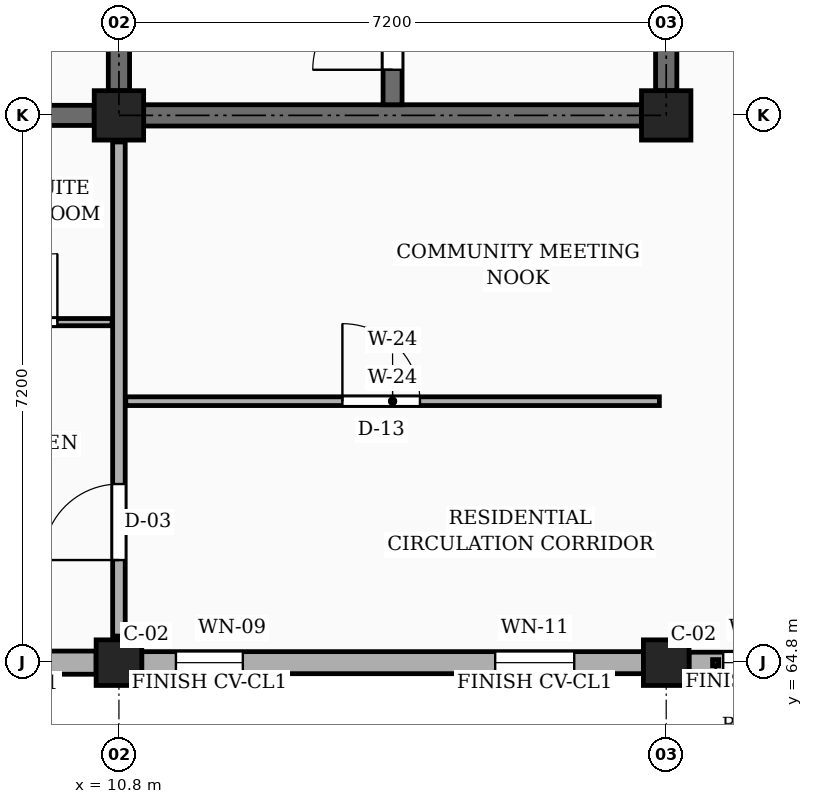
"""IFC4 building model, lengths in metres.
Left out: names, types, materials, properties, quantities, classifications, styles, units other than length and angle.
Written with IfcOpenShell. Run it as: python <this file> out.ifc"""

import sys

from ifc_helpers import new_model, si_unit, direction, frame, frame_2d, origin, origin_2d, place, context, subcontext, project, spatial, rectangle, extrude, element, fill, save


model = new_model("IFC4")
c1 = context("Model", 3, precision=1e-05, world=origin(), true_north=direction((0.0, 1.0)))
c2 = subcontext(c1, "Body", "Model", "MODEL_VIEW")
j1 = project(units=[si_unit("LENGTHUNIT", "METRE"), si_unit("PLANEANGLEUNIT", "RADIAN")], contexts=[c1])
p1 = place(None, origin())
s1 = spatial("IfcSite", under=j1, at=p1, CompositionType="ELEMENT")
p2 = place(p1, origin())
s2 = spatial("IfcBuilding", under=s1, at=p2, CompositionType="ELEMENT")
p3 = place(p2, frame((0.0, 0.0, 7.65)))
s3 = spatial("IfcBuildingStorey", under=s2, at=p3, CompositionType="ELEMENT", Elevation=7.65)
p4 = place(p3, frame((10.8, 64.8, 0.0), z_axis=(0.0, 0.0, 1.0), x_axis=(1.0, 0.0, 0.0)))
e1 = element("IfcColumn", 1, at=p4, inside=s3, PredefinedType="COLUMN", context=c2, shape_type="SweptSolid", body=[
    extrude(rectangle(XDim=0.6, YDim=0.6, at=origin_2d()), origin(), (0.0, 0.0, 1.0), 3.15),
])
p5 = place(p3, frame((10.8, 72.0, 0.0), z_axis=(0.0, 0.0, 1.0), x_axis=(1.0, 0.0, 0.0)))
e2 = element("IfcColumn", 2, at=p5, inside=s3, PredefinedType="COLUMN", context=c2, shape_type="SweptSolid", body=[
    extrude(rectangle(XDim=0.65, YDim=0.65, at=origin_2d()), origin(), (0.0, 0.0, 1.0), 3.15),
])
p6 = place(p3, frame((18.0, 64.8, 0.0), z_axis=(0.0, 0.0, 1.0), x_axis=(1.0, 0.0, 0.0)))
e3 = element("IfcColumn", 3, at=p6, inside=s3, PredefinedType="COLUMN", context=c2, shape_type="SweptSolid", body=[
    extrude(rectangle(XDim=0.6, YDim=0.6, at=origin_2d()), origin(), (0.0, 0.0, 1.0), 3.15),
])
p7 = place(p3, frame((18.0, 72.0, 0.0), z_axis=(0.0, 0.0, 1.0), x_axis=(1.0, 0.0, 0.0)))
e4 = element("IfcColumn", 4, at=p7, inside=s3, PredefinedType="COLUMN", context=c2, shape_type="SweptSolid", body=[
    extrude(rectangle(XDim=0.65, YDim=0.65, at=origin_2d()), origin(), (0.0, 0.0, 1.0), 3.15),
])
p8 = place(p3, frame((3.9, 72.0, 0.0), z_axis=(0.0, 0.0, 1.0), x_axis=(1.0, 0.0, 0.0)))
e5 = element("IfcWall", 5, at=p8, inside=s3, PredefinedType="SOLIDWALL", context=c2, shape_type="SweptSolid", body=[
    extrude(rectangle(XDim=6.575, YDim=0.265, at=frame_2d((3.288, 0.0))), origin(), (0.0, 0.0, 1.0), 2.21),
])
p9 = place(p8, frame((1.35, 0.0, 0.0)))
e6 = element("IfcOpeningElement", 6, at=p9, cuts=e5, PredefinedType="OPENING", context=c2, shape_type="SweptSolid", body=[
    extrude(rectangle(XDim=0.98, YDim=2.12, at=frame_2d((0.49, 1.06))), frame((0.0, 0.143, 0.0), z_axis=(0.0, -1.0, 0.0), x_axis=(1.0, 0.0, 0.0)), (0.0, 0.0, 1.0), 0.285),
])
p10 = place(p3, frame((3.9, 64.8, 0.0), z_axis=(0.0, 0.0, 1.0), x_axis=(1.0, 0.0, 0.0)))
e7 = element("IfcWall", 7, at=p10, inside=s3, PredefinedType="SOLIDWALL", context=c2, shape_type="SweptSolid", body=[
    extrude(rectangle(XDim=6.6, YDim=0.305, at=frame_2d((3.3, 0.0))), origin(), (0.0, 0.0, 1.0), 2.48),
])
p11 = place(p10, frame((0.45, 0.0, 0.78)))
e8 = element("IfcOpeningElement", 8, at=p11, cuts=e7, PredefinedType="OPENING", context=c2, shape_type="SweptSolid", body=[
    extrude(rectangle(XDim=1.32, YDim=1.15, at=frame_2d((0.66, 0.575))), frame((0.0, 0.163, 0.0), z_axis=(0.0, -1.0, 0.0), x_axis=(1.0, 0.0, 0.0)), (0.0, 0.0, 1.0), 0.325),
])
p12 = place(p10, frame((4.65, 0.0, 0.78)))
e9 = element("IfcOpeningElement", 9, at=p12, cuts=e7, PredefinedType="OPENING", context=c2, shape_type="SweptSolid", body=[
    extrude(rectangle(XDim=0.88, YDim=1.26, at=frame_2d((0.44, 0.63))), frame((0.0, 0.163, 0.0), z_axis=(0.0, -1.0, 0.0), x_axis=(1.0, 0.0, 0.0)), (0.0, 0.0, 1.0), 0.325),
])
p13 = place(p3, frame((11.1, 64.8, 0.0), z_axis=(0.0, 0.0, 1.0), x_axis=(1.0, 0.0, 0.0)))
e10 = element("IfcWall", 10, at=p13, inside=s3, PredefinedType="SOLIDWALL", context=c2, shape_type="SweptSolid", body=[
    extrude(rectangle(XDim=6.6, YDim=0.29, at=frame_2d((3.3, 0.0))), origin(), (0.0, 0.0, 1.0), 2.48),
])
p14 = place(p13, frame((0.45, 0.0, 0.78)))
e11 = element("IfcOpeningElement", 11, at=p14, cuts=e10, PredefinedType="OPENING", context=c2, shape_type="SweptSolid", body=[
    extrude(rectangle(XDim=0.88, YDim=1.26, at=frame_2d((0.44, 0.63))), frame((0.0, 0.155, 0.0), z_axis=(0.0, -1.0, 0.0), x_axis=(1.0, 0.0, 0.0)), (0.0, 0.0, 1.0), 0.31),
])
p15 = place(p13, frame((4.65, 0.0, 0.78)))
e12 = element("IfcOpeningElement", 12, at=p15, cuts=e10, PredefinedType="OPENING", context=c2, shape_type="SweptSolid", body=[
    extrude(rectangle(XDim=1.04, YDim=1.26, at=frame_2d((0.52, 0.63))), frame((0.0, 0.155, 0.0), z_axis=(0.0, -1.0, 0.0), x_axis=(1.0, 0.0, 0.0)), (0.0, 0.0, 1.0), 0.31),
])
p16 = place(p3, frame((18.3, 64.8, 0.0), z_axis=(0.0, 0.0, 1.0), x_axis=(1.0, 0.0, 0.0)))
e13 = element("IfcWall", 13, at=p16, inside=s3, PredefinedType="SOLIDWALL", context=c2, shape_type="SweptSolid", body=[
    extrude(rectangle(XDim=6.6, YDim=0.275, at=frame_2d((3.3, 0.0))), origin(), (0.0, 0.0, 1.0), 2.48),
])
p17 = place(p16, frame((0.45, 0.0, 0.78)))
e14 = element("IfcOpeningElement", 14, at=p17, cuts=e13, PredefinedType="OPENING", context=c2, shape_type="SweptSolid", body=[
    extrude(rectangle(XDim=1.04, YDim=1.26, at=frame_2d((0.52, 0.63))), frame((0.0, 0.147, 0.0), z_axis=(0.0, -1.0, 0.0), x_axis=(1.0, 0.0, 0.0)), (0.0, 0.0, 1.0), 0.295),
])
p18 = place(p16, frame((2.15, 0.0, 0.78)))
e15 = element("IfcOpeningElement", 15, at=p18, cuts=e13, PredefinedType="OPENING", context=c2, shape_type="SweptSolid", body=[
    extrude(rectangle(XDim=1.2, YDim=1.26, at=frame_2d((0.6, 0.63))), frame((0.0, 0.147, 0.0), z_axis=(0.0, -1.0, 0.0), x_axis=(1.0, 0.0, 0.0)), (0.0, 0.0, 1.0), 0.295),
])
p19 = place(p16, frame((4.4, 0.0, 0.78)))
e16 = element("IfcOpeningElement", 16, at=p19, cuts=e13, PredefinedType="OPENING", context=c2, shape_type="SweptSolid", body=[
    extrude(rectangle(XDim=1.36, YDim=1.26, at=frame_2d((0.68, 0.63))), frame((0.0, 0.147, 0.0), z_axis=(0.0, -1.0, 0.0), x_axis=(1.0, 0.0, 0.0)), (0.0, 0.0, 1.0), 0.295),
])
p20 = place(p3, frame((10.8, 72.325, 0.0), z_axis=(0.0, 0.0, 1.0), x_axis=(0.0, 1.0, 0.0)))
e17 = element("IfcWall", 17, at=p20, inside=s3, PredefinedType="SHEAR", context=c2, shape_type="SweptSolid", body=[
    extrude(rectangle(XDim=6.55, YDim=0.28, at=frame_2d((3.275, 0.0))), origin(), (0.0, 0.0, 1.0), 2.91),
])
p21 = place(p3, frame((18.0, 72.325, 0.0), z_axis=(0.0, 0.0, 1.0), x_axis=(0.0, 1.0, 0.0)))
e18 = element("IfcWall", 18, at=p21, inside=s3, PredefinedType="SHEAR", context=c2, shape_type="SweptSolid", body=[
    extrude(rectangle(XDim=6.55, YDim=0.28, at=frame_2d((3.275, 0.0))), origin(), (0.0, 0.0, 1.0), 2.91),
])
p22 = place(p21, frame((1.5, 0.0, 0.0)))
e19 = element("IfcOpeningElement", 19, at=p22, cuts=e18, PredefinedType="OPENING", context=c2, shape_type="SweptSolid", body=[
    extrude(rectangle(XDim=1.1, YDim=2.15, at=frame_2d((0.55, 1.075))), frame((0.0, 0.15, 0.0), z_axis=(0.0, -1.0, 0.0), x_axis=(1.0, 0.0, 0.0)), (0.0, 0.0, 1.0), 0.3),
])
p23 = place(p3, frame((11.125, 72.0, 0.0), z_axis=(0.0, 0.0, 1.0), x_axis=(1.0, 0.0, 0.0)))
e20 = element("IfcWall", 20, at=p23, inside=s3, PredefinedType="SHEAR", context=c2, shape_type="SweptSolid", body=[
    extrude(rectangle(XDim=6.55, YDim=0.28, at=frame_2d((3.275, 0.0))), origin(), (0.0, 0.0, 1.0), 2.91),
])
p24 = place(p3, frame((14.4, 72.14, 0.0), z_axis=(0.0, 0.0, 1.0), x_axis=(0.0, 1.0, 0.0)))
e21 = element("IfcWall", 21, at=p24, inside=s3, PredefinedType="SHEAR", context=c2, shape_type="SweptSolid", body=[
    extrude(rectangle(XDim=6.92, YDim=0.25, at=frame_2d((3.46, 0.0))), origin(), (0.0, 0.0, 1.0), 2.91),
])
p25 = place(p24, frame((0.46, 0.0, 0.0)))
e22 = element("IfcOpeningElement", 22, at=p25, cuts=e21, PredefinedType="OPENING", context=c2, shape_type="SweptSolid", body=[
    extrude(rectangle(XDim=1.05, YDim=2.15, at=frame_2d((0.525, 1.075))), frame((0.0, 0.135, 0.0), z_axis=(0.0, -1.0, 0.0), x_axis=(1.0, 0.0, 0.0)), (0.0, 0.0, 1.0), 0.27),
])
p26 = place(p3, frame((10.8, 65.15, 0.0), z_axis=(0.0, 0.0, 1.0), x_axis=(0.0, 1.0, 0.0)))
e23 = element("IfcWall", 23, at=p26, inside=s3, PredefinedType="PARTITIONING", context=c2, shape_type="SweptSolid", body=[
    extrude(rectangle(XDim=6.5, YDim=0.165, at=frame_2d((3.25, 0.0))), origin(), (0.0, 0.0, 1.0), 2.26),
])
p27 = place(p26, frame((1.0, 0.0, 0.0)))
e24 = element("IfcOpeningElement", 24, at=p27, cuts=e23, PredefinedType="OPENING", context=c2, shape_type="SweptSolid", body=[
    extrude(rectangle(XDim=1.0, YDim=2.15, at=frame_2d((0.5, 1.075))), frame((0.0, 0.093, 0.0), z_axis=(0.0, -1.0, 0.0), x_axis=(1.0, 0.0, 0.0)), (0.0, 0.0, 1.0), 0.185),
])
p28 = place(p3, frame((10.89, 68.24, 0.0), z_axis=(0.0, 0.0, 1.0), x_axis=(1.0, 0.0, 0.0)))
e25 = element("IfcWall", 25, at=p28, inside=s3, PredefinedType="PARTITIONING", context=c2, shape_type="SweptSolid", body=[
    extrude(rectangle(XDim=7.02, YDim=0.115, at=frame_2d((3.51, 0.0))), origin(), (0.0, 0.0, 1.0), 2.345),
])
p29 = place(p28, frame((2.85, 0.0, 0.0)))
e26 = element("IfcOpeningElement", 26, at=p29, cuts=e25, PredefinedType="OPENING", context=c2, shape_type="SweptSolid", body=[
    extrude(rectangle(XDim=1.02, YDim=2.15, at=frame_2d((0.51, 1.075))), frame((0.0, 0.067, 0.0), z_axis=(0.0, -1.0, 0.0), x_axis=(1.0, 0.0, 0.0)), (0.0, 0.0, 1.0), 0.135),
])
p30 = place(p3, frame((8.37, 69.28, 0.0), z_axis=(0.0, 0.0, 1.0), x_axis=(1.0, 0.0, 0.0)))
e27 = element("IfcWall", 27, at=p30, inside=s3, PredefinedType="PARTITIONING", context=c2, shape_type="SweptSolid", body=[
    extrude(rectangle(XDim=2.34, YDim=0.095, at=frame_2d((1.17, 0.0))), origin(), (0.0, 0.0, 1.0), 2.345),
])
p31 = place(p30, frame((0.72, 0.0, 0.0)))
e28 = element("IfcOpeningElement", 28, at=p31, cuts=e27, PredefinedType="OPENING", context=c2, shape_type="SweptSolid", body=[
    extrude(rectangle(XDim=0.9, YDim=2.05, at=frame_2d((0.45, 1.025))), frame((0.0, 0.058, 0.0), z_axis=(0.0, -1.0, 0.0), x_axis=(1.0, 0.0, 0.0)), (0.0, 0.0, 1.0), 0.115),
])
p32 = place(p14, origin())
e29 = element("IfcWindow", 29, at=p32, inside=s3, PartitioningType="SINGLE_PANEL", PredefinedType="WINDOW", context=c2, shape_type="SweptSolid", body=[
    extrude(rectangle(XDim=0.88, YDim=1.26, at=frame_2d((0.44, 0.63))), frame((0.0, 0.03, 0.0), z_axis=(0.0, -1.0, 0.0), x_axis=(1.0, 0.0, 0.0)), (0.0, 0.0, 1.0), 0.06),
])
fill(e11, e29)
p33 = place(p15, origin())
e30 = element("IfcWindow", 30, at=p33, inside=s3, PartitioningType="SINGLE_PANEL", PredefinedType="WINDOW", context=c2, shape_type="SweptSolid", body=[
    extrude(rectangle(XDim=1.04, YDim=1.26, at=frame_2d((0.52, 0.63))), frame((0.0, 0.03, 0.0), z_axis=(0.0, -1.0, 0.0), x_axis=(1.0, 0.0, 0.0)), (0.0, 0.0, 1.0), 0.06),
])
fill(e12, e30)
p34 = place(p17, origin())
e31 = element("IfcWindow", 31, at=p34, inside=s3, PartitioningType="SINGLE_PANEL", PredefinedType="WINDOW", context=c2, shape_type="SweptSolid", body=[
    extrude(rectangle(XDim=1.04, YDim=1.26, at=frame_2d((0.52, 0.63))), frame((0.0, 0.03, 0.0), z_axis=(0.0, -1.0, 0.0), x_axis=(1.0, 0.0, 0.0)), (0.0, 0.0, 1.0), 0.06),
])
fill(e14, e31)
p35 = place(p25, origin())
e32 = element("IfcDoor", 32, at=p35, inside=s3, OperationType="SINGLE_SWING_LEFT", PredefinedType="DOOR", context=c2, shape_type="SweptSolid", body=[
    extrude(rectangle(XDim=1.05, YDim=2.15, at=frame_2d((0.525, 1.075))), frame((0.0, 0.025, 0.0), z_axis=(0.0, -1.0, 0.0), x_axis=(1.0, 0.0, 0.0)), (0.0, 0.0, 1.0), 0.05),
])
fill(e22, e32)
p36 = place(p27, origin())
e33 = element("IfcDoor", 33, at=p36, inside=s3, OperationType="SINGLE_SWING_LEFT", PredefinedType="DOOR", context=c2, shape_type="SweptSolid", body=[
    extrude(rectangle(XDim=1.0, YDim=2.15, at=frame_2d((0.5, 1.075))), frame((0.0, 0.025, 0.0), z_axis=(0.0, -1.0, 0.0), x_axis=(1.0, 0.0, 0.0)), (0.0, 0.0, 1.0), 0.05),
])
fill(e24, e33)
p37 = place(p29, origin())
e34 = element("IfcDoor", 34, at=p37, inside=s3, OperationType="SINGLE_SWING_LEFT", PredefinedType="DOOR", context=c2, shape_type="SweptSolid", body=[
    extrude(rectangle(XDim=1.02, YDim=2.15, at=frame_2d((0.51, 1.075))), frame((0.0, 0.025, 0.0), z_axis=(0.0, -1.0, 0.0), x_axis=(1.0, 0.0, 0.0)), (0.0, 0.0, 1.0), 0.05),
])
fill(e26, e34)
p38 = place(p31, origin())
e35 = element("IfcDoor", 35, at=p38, inside=s3, OperationType="SINGLE_SWING_RIGHT", PredefinedType="DOOR", context=c2, shape_type="SweptSolid", body=[
    extrude(rectangle(XDim=0.9, YDim=2.05, at=frame_2d((0.45, 1.025))), frame((0.0, 0.025, 0.0), z_axis=(0.0, -1.0, 0.0), x_axis=(1.0, 0.0, 0.0)), (0.0, 0.0, 1.0), 0.05),
])
fill(e28, e35)
save(model, sys.argv[1])
